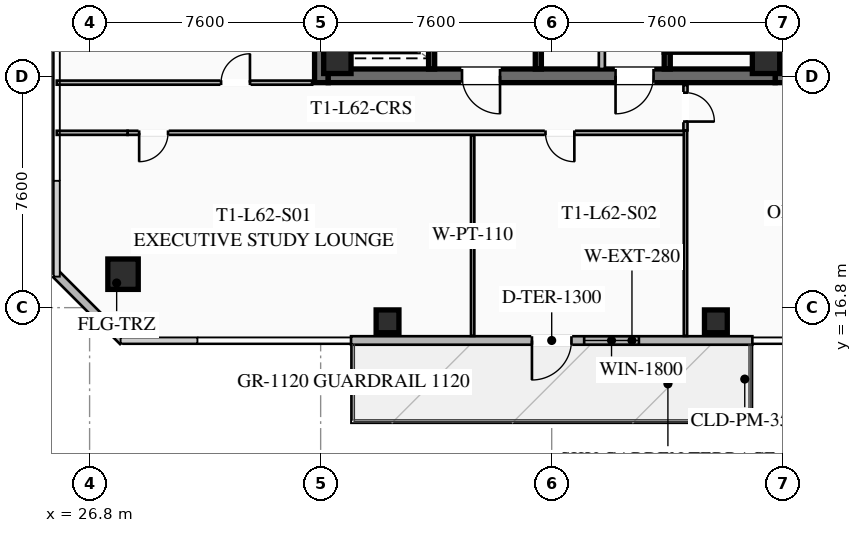
"""IFC4 building model, lengths in metres.
Left out: names, types, materials, properties, quantities, classifications, styles, units other than length and angle.
Written with IfcOpenShell. Run it as: python <this file> out.ifc"""

import sys

from ifc_helpers import new_model, si_unit, direction, frame, frame_2d, origin, origin_2d, place, context, subcontext, project, spatial, rectangle, hollow_rectangle, extrude, element, fill, save


model = new_model("IFC4")
c1 = context("Model", 3, precision=1e-05, world=origin(), true_north=direction((0.0, 1.0)))
c2 = subcontext(c1, "Body", "Model", "MODEL_VIEW")
j1 = project(units=[si_unit("LENGTHUNIT", "METRE"), si_unit("PLANEANGLEUNIT", "RADIAN")], contexts=[c1])
p1 = place(None, origin())
s1 = spatial("IfcSite", under=j1, at=p1, CompositionType="ELEMENT")
p2 = place(p1, origin())
s2 = spatial("IfcBuilding", under=s1, at=p2, CompositionType="ELEMENT")
p3 = place(p2, frame((0.0, 0.0, 229.05)))
s3 = spatial("IfcBuildingStorey", under=s2, at=p3, CompositionType="ELEMENT", Elevation=229.05)
for number, where, z_axis, x_axis in (
    (1, (34.425, 24.2, 0.0), (0.0, 0.0, 1.0), (0.0, 1.0, 0.0)),
    (2, (49.575, 39.8, 0.0), (0.0, 0.0, 1.0), (0.0, -1.0, 0.0)),
):
    element("IfcWall", number, at=place(p3, frame(where, z_axis=z_axis, x_axis=x_axis)), inside=s3, PredefinedType="SHEAR", context=c2, shape_type="SweptSolid", body=[
        extrude(rectangle(XDim=15.6, YDim=0.45, at=frame_2d((7.8, 0.0))), origin(), (0.0, 0.0, 1.0), 3.55),
    ])
p4 = place(p3, frame((49.35, 24.425, 0.0), z_axis=(0.0, 0.0, 1.0), x_axis=(-1.0, 0.0, 0.0)))
e3 = element("IfcWall", 3, at=p4, inside=s3, PredefinedType="SHEAR", context=c2, shape_type="SweptSolid", body=[
    extrude(rectangle(XDim=14.7, YDim=0.45, at=frame_2d((7.35, 0.0))), origin(), (0.0, 0.0, 1.0), 3.55),
])
p5 = place(p4, frame((9.05, 0.0, 0.0)))
e4 = element("IfcOpeningElement", 4, at=p5, cuts=e3, PredefinedType="OPENING", context=c2, shape_type="SweptSolid", body=[
    extrude(rectangle(XDim=1.25, YDim=2.25, at=frame_2d((0.625, 1.125))), frame((0.0, 0.235, 0.0), z_axis=(0.0, -1.0, 0.0), x_axis=(1.0, 0.0, 0.0)), (0.0, 0.0, 1.0), 0.47),
])
p6 = place(p4, frame((4.0, 0.0, 0.0)))
e5 = element("IfcOpeningElement", 5, at=p6, cuts=e3, PredefinedType="OPENING", context=c2, shape_type="SweptSolid", body=[
    extrude(rectangle(XDim=1.25, YDim=2.25, at=frame_2d((0.625, 1.125))), frame((0.0, 0.235, 0.0), z_axis=(0.0, -1.0, 0.0), x_axis=(1.0, 0.0, 0.0)), (0.0, 0.0, 1.0), 0.47),
])
for number, where, z_axis, x_axis in (
    (6, (34.95, 24.95, 0.0), (0.0, 0.0, 1.0), (1.0, 0.0, 0.0)),
    (7, (49.05, 24.95, 0.0), (0.0, 0.0, 1.0), (1.0, 0.0, 0.0)),
):
    element("IfcColumn", number, at=place(p3, frame(where, z_axis=z_axis, x_axis=x_axis)), inside=s3, PredefinedType="COLUMN", context=c2, shape_type="SweptSolid", body=[
        extrude(hollow_rectangle(XDim=0.9, YDim=0.9, WallThickness=0.04, at=origin_2d()), origin(), (0.0, 0.0, 1.0), 3.37),
    ])
p7 = place(p3, frame((27.9, 17.9, 0.0), z_axis=(0.0, 0.0, 1.0), x_axis=(1.0, 0.0, 0.0)))
e8 = element("IfcColumn", 8, at=p7, inside=s3, PredefinedType="COLUMN", context=c2, shape_type="SweptSolid", body=[
    extrude(hollow_rectangle(XDim=1.0, YDim=1.0, WallThickness=0.04, at=origin_2d()), origin(), (0.0, 0.0, 1.0), 3.37),
])
for number, where, z_axis, x_axis in (
    (9, (36.6, 16.35, 0.0), (0.0, 0.0, 1.0), (1.0, 0.0, 0.0)),
    (10, (47.4, 16.35, 0.0), (0.0, 0.0, 1.0), (1.0, 0.0, 0.0)),
):
    element("IfcColumn", number, at=place(p3, frame(where, z_axis=z_axis, x_axis=x_axis)), inside=s3, PredefinedType="COLUMN", context=c2, shape_type="SweptSolid", body=[
        extrude(hollow_rectangle(XDim=0.75, YDim=0.75, WallThickness=0.032, at=origin_2d()), origin(), (0.0, 0.0, 1.0), 3.37),
    ])
p8 = place(p3, frame((48.6, 15.72, 0.0), z_axis=(0.0, 0.0, 1.0), x_axis=(-1.0, 0.0, 0.0)))
e11 = element("IfcWall", 11, at=p8, inside=s3, PredefinedType="SOLIDWALL", context=c2, shape_type="SweptSolid", body=[
    extrude(rectangle(XDim=13.2, YDim=0.28, at=frame_2d((6.6, 0.0))), origin(), (0.0, 0.0, 1.0), 3.37),
])
p9 = place(p8, frame((5.95, 0.0, 0.0)))
e12 = element("IfcOpeningElement", 12, at=p9, cuts=e11, PredefinedType="OPENING", context=c2, shape_type="SweptSolid", body=[
    extrude(rectangle(XDim=1.3, YDim=2.15, at=frame_2d((0.65, 1.075))), frame((0.0, 0.15, 0.0), z_axis=(0.0, -1.0, 0.0), x_axis=(1.0, 0.0, 0.0)), (0.0, 0.0, 1.0), 0.3),
])
p10 = place(p8, frame((3.732, 0.0, 0.85)))
e13 = element("IfcOpeningElement", 13, at=p10, cuts=e11, PredefinedType="OPENING", context=c2, shape_type="SweptSolid", body=[
    extrude(rectangle(XDim=1.8, YDim=1.92, at=frame_2d((0.9, 0.96))), frame((0.0, 0.15, 0.0), z_axis=(0.0, -1.0, 0.0), x_axis=(1.0, 0.0, 0.0)), (0.0, 0.0, 1.0), 0.3),
])
p11 = place(p3, frame((27.9, 15.7, 0.0), z_axis=(0.0, 0.0, 1.0), x_axis=(-0.707106781187, 0.707106781187, 0.0)))
e14 = element("IfcWall", 14, at=p11, inside=s3, PredefinedType="SOLIDWALL", context=c2, shape_type="SweptSolid", body=[
    extrude(rectangle(XDim=3.111, YDim=0.28, at=frame_2d((1.556, 0.0))), origin(), (0.0, 0.0, 1.0), 3.37),
])
p12 = place(p3, frame((45.8, 32.8, 0.0), z_axis=(0.0, 0.0, 1.0), x_axis=(0.0, -1.0, 0.0)))
e15 = element("IfcWall", 15, at=p12, inside=s3, PredefinedType="SHEAR", context=c2, shape_type="SweptSolid", body=[
    extrude(rectangle(XDim=8.15, YDim=0.2, at=frame_2d((4.075, 0.0))), origin(), (0.0, 0.0, 1.0), 3.37),
])
p13 = place(p12, frame((0.45, 0.0, 0.0)))
e16 = element("IfcOpeningElement", 16, at=p13, cuts=e15, PredefinedType="OPENING", context=c2, shape_type="SweptSolid", body=[
    extrude(rectangle(XDim=1.15, YDim=2.2, at=frame_2d((0.575, 1.1))), frame((0.0, 0.11, 0.0), z_axis=(0.0, -1.0, 0.0), x_axis=(1.0, 0.0, 0.0)), (0.0, 0.0, 1.0), 0.22),
])
p14 = place(p3, frame((41.56, 24.65, 0.0), z_axis=(0.0, 0.0, 1.0), x_axis=(0.0, 1.0, 0.0)))
e17 = element("IfcWall", 17, at=p14, inside=s3, PredefinedType="SHEAR", context=c2, shape_type="SweptSolid", body=[
    extrude(rectangle(XDim=14.7, YDim=0.2, at=frame_2d((7.35, 0.0))), origin(), (0.0, 0.0, 1.0), 3.37),
])
p15 = place(p3, frame((38.05, 24.65, 0.0), z_axis=(0.0, 0.0, 1.0), x_axis=(0.0, 1.0, 0.0)))
e18 = element("IfcWall", 18, at=p15, inside=s3, PredefinedType="SHEAR", context=c2, shape_type="SweptSolid", body=[
    extrude(rectangle(XDim=6.55, YDim=0.2, at=frame_2d((3.275, 0.0))), origin(), (0.0, 0.0, 1.0), 3.37),
])
p16 = place(p15, frame((4.975, 0.0, 0.0)))
e19 = element("IfcOpeningElement", 19, at=p16, cuts=e18, PredefinedType="OPENING", context=c2, shape_type="SweptSolid", body=[
    extrude(rectangle(XDim=1.3, YDim=2.25, at=frame_2d((0.65, 1.125))), frame((0.0, 0.11, 0.0), z_axis=(0.0, -1.0, 0.0), x_axis=(1.0, 0.0, 0.0)), (0.0, 0.0, 1.0), 0.22),
])
p17 = place(p15, frame((2.975, 0.0, 0.0)))
e20 = element("IfcOpeningElement", 20, at=p17, cuts=e18, PredefinedType="OPENING", context=c2, shape_type="SweptSolid", body=[
    extrude(rectangle(XDim=1.3, YDim=2.25, at=frame_2d((0.65, 1.125))), frame((0.0, 0.11, 0.0), z_axis=(0.0, -1.0, 0.0), x_axis=(1.0, 0.0, 0.0)), (0.0, 0.0, 1.0), 0.22),
])
p18 = place(p15, frame((0.775, 0.0, 0.0)))
e21 = element("IfcOpeningElement", 21, at=p18, cuts=e18, PredefinedType="OPENING", context=c2, shape_type="SweptSolid", body=[
    extrude(rectangle(XDim=1.3, YDim=2.25, at=frame_2d((0.65, 1.125))), frame((0.0, 0.11, 0.0), z_axis=(0.0, -1.0, 0.0), x_axis=(1.0, 0.0, 0.0)), (0.0, 0.0, 1.0), 0.22),
])
p19 = place(p3, frame((43.65, 24.65, 0.0), z_axis=(0.0, 0.0, 1.0), x_axis=(0.0, 1.0, 0.0)))
e22 = element("IfcWall", 22, at=p19, inside=s3, PredefinedType="SOLIDWALL", context=c2, shape_type="SweptSolid", body=[
    extrude(rectangle(XDim=7.0, YDim=0.2, at=frame_2d((3.5, 0.0))), origin(), (0.0, 0.0, 1.0), 2.513),
])
p20 = place(p19, frame((0.85, 0.0, 0.0)))
e23 = element("IfcOpeningElement", 23, at=p20, cuts=e22, PredefinedType="OPENING", context=c2, shape_type="SweptSolid", body=[
    extrude(rectangle(XDim=0.95, YDim=2.05, at=frame_2d((0.475, 1.025))), frame((0.0, 0.11, 0.0), z_axis=(0.0, -1.0, 0.0), x_axis=(1.0, 0.0, 0.0)), (0.0, 0.0, 1.0), 0.22),
])
p21 = place(p19, frame((4.8, 0.0, 0.0)))
e24 = element("IfcOpeningElement", 24, at=p21, cuts=e22, PredefinedType="OPENING", context=c2, shape_type="SweptSolid", body=[
    extrude(rectangle(XDim=1.05, YDim=2.2, at=frame_2d((0.525, 1.1))), frame((0.0, 0.11, 0.0), z_axis=(0.0, -1.0, 0.0), x_axis=(1.0, 0.0, 0.0)), (0.0, 0.0, 1.0), 0.22),
])
p22 = place(p3, frame((46.4, 22.55, 0.0), z_axis=(0.0, 0.0, 1.0), x_axis=(-1.0, 0.0, 0.0)))
e25 = element("IfcWall", 25, at=p22, inside=s3, PredefinedType="PARTITIONING", context=c2, shape_type="SweptSolid", body=[
    extrude(rectangle(XDim=18.35, YDim=0.135, at=frame_2d((9.175, 0.0))), origin(), (0.0, 0.0, 1.0), 2.513),
])
p23 = place(p22, frame((17.02, 0.0, 0.0)))
e26 = element("IfcOpeningElement", 26, at=p23, cuts=e25, PredefinedType="OPENING", context=c2, shape_type="SweptSolid", body=[
    extrude(rectangle(XDim=0.95, YDim=2.05, at=frame_2d((0.475, 1.025))), frame((0.0, 0.077, 0.0), z_axis=(0.0, -1.0, 0.0), x_axis=(1.0, 0.0, 0.0)), (0.0, 0.0, 1.0), 0.155),
])
p24 = place(p22, frame((3.655, 0.0, 0.0)))
e27 = element("IfcOpeningElement", 27, at=p24, cuts=e25, PredefinedType="OPENING", context=c2, shape_type="SweptSolid", body=[
    extrude(rectangle(XDim=0.95, YDim=2.05, at=frame_2d((0.475, 1.025))), frame((0.0, 0.077, 0.0), z_axis=(0.0, -1.0, 0.0), x_axis=(1.0, 0.0, 0.0)), (0.0, 0.0, 1.0), 0.155),
])
p25 = place(p3, frame((25.72, 22.55, 0.0), z_axis=(0.0, 0.0, 1.0), x_axis=(1.0, 0.0, 0.0)))
e28 = element("IfcWall", 28, at=p25, inside=s3, PredefinedType="PARTITIONING", context=c2, shape_type="SweptSolid", body=[
    extrude(rectangle(XDim=2.33, YDim=0.135, at=frame_2d((1.165, 0.0))), origin(), (0.0, 0.0, 1.0), 2.513),
])
p26 = place(p3, frame((46.4, 24.12, 0.0), z_axis=(0.0, 0.0, 1.0), x_axis=(0.0, -1.0, 0.0)))
e29 = element("IfcWall", 29, at=p26, inside=s3, PredefinedType="PARTITIONING", context=c2, shape_type="SweptSolid", body=[
    extrude(rectangle(XDim=1.49, YDim=0.135, at=frame_2d((0.745, 0.0))), origin(), (0.0, 0.0, 1.0), 2.513),
])
p27 = place(p26, frame((0.25, 0.0, 0.0)))
e30 = element("IfcOpeningElement", 30, at=p27, cuts=e29, PredefinedType="OPENING", context=c2, shape_type="SweptSolid", body=[
    extrude(rectangle(XDim=0.95, YDim=2.05, at=frame_2d((0.475, 1.025))), frame((0.0, 0.077, 0.0), z_axis=(0.0, -1.0, 0.0), x_axis=(1.0, 0.0, 0.0)), (0.0, 0.0, 1.0), 0.155),
])
p28 = place(p3, frame((39.4, 15.87, 0.0), z_axis=(0.0, 0.0, 1.0), x_axis=(0.0, 1.0, 0.0)))
e31 = element("IfcWall", 31, at=p28, inside=s3, PredefinedType="PARTITIONING", context=c2, shape_type="SweptSolid", body=[
    extrude(rectangle(XDim=6.6, YDim=0.11, at=frame_2d((3.3, 0.0))), origin(), (0.0, 0.0, 1.0), 2.513),
])
p29 = place(p3, frame((46.4, 15.87, 0.0), z_axis=(0.0, 0.0, 1.0), x_axis=(0.0, 1.0, 0.0)))
e32 = element("IfcWall", 32, at=p29, inside=s3, PredefinedType="PARTITIONING", context=c2, shape_type="SweptSolid", body=[
    extrude(rectangle(XDim=6.76, YDim=0.11, at=frame_2d((3.38, 0.0))), origin(), (0.0, 0.0, 1.0), 2.513),
])
p30 = place(p3, frame((25.72, 24.2, 0.0), z_axis=(0.0, 0.0, 1.0), x_axis=(1.0, 0.0, 0.0)))
e33 = element("IfcWall", 33, at=p30, inside=s3, PredefinedType="PARTITIONING", context=c2, shape_type="SweptSolid", body=[
    extrude(rectangle(XDim=8.4, YDim=0.135, at=frame_2d((4.2, 0.0))), origin(), (0.0, 0.0, 1.0), 2.513),
])
p31 = place(p30, frame((5.405, 0.0, 0.0)))
e34 = element("IfcOpeningElement", 34, at=p31, cuts=e33, PredefinedType="OPENING", context=c2, shape_type="SweptSolid", body=[
    extrude(rectangle(XDim=0.95, YDim=2.05, at=frame_2d((0.475, 1.025))), frame((0.0, 0.077, 0.0), z_axis=(0.0, -1.0, 0.0), x_axis=(1.0, 0.0, 0.0)), (0.0, 0.0, 1.0), 0.155),
])
p32 = place(p9, origin())
e35 = element("IfcDoor", 35, at=p32, inside=s3, OperationType="SINGLE_SWING_RIGHT", PredefinedType="DOOR", context=c2, shape_type="SweptSolid", body=[
    extrude(rectangle(XDim=1.3, YDim=2.15, at=frame_2d((0.65, 1.075))), frame((0.0, 0.025, 0.0), z_axis=(0.0, -1.0, 0.0), x_axis=(1.0, 0.0, 0.0)), (0.0, 0.0, 1.0), 0.05),
])
fill(e12, e35)
p33 = place(p10, origin())
e36 = element("IfcWindow", 36, at=p33, inside=s3, PartitioningType="SINGLE_PANEL", PredefinedType="WINDOW", context=c2, shape_type="SweptSolid", body=[
    extrude(rectangle(XDim=1.8, YDim=1.92, at=frame_2d((0.9, 0.96))), frame((0.0, 0.03, 0.0), z_axis=(0.0, -1.0, 0.0), x_axis=(1.0, 0.0, 0.0)), (0.0, 0.0, 1.0), 0.06),
])
fill(e13, e36)
p34 = place(p5, origin())
e37 = element("IfcDoor", 37, at=p34, inside=s3, OperationType="SINGLE_SWING_LEFT", PredefinedType="DOOR", context=c2, shape_type="SweptSolid", body=[
    extrude(rectangle(XDim=1.25, YDim=2.25, at=frame_2d((0.625, 1.125))), frame((0.0, 0.025, 0.0), z_axis=(0.0, -1.0, 0.0), x_axis=(1.0, 0.0, 0.0)), (0.0, 0.0, 1.0), 0.05),
])
fill(e4, e37)
p35 = place(p6, origin())
e38 = element("IfcDoor", 38, at=p35, inside=s3, OperationType="SINGLE_SWING_RIGHT", PredefinedType="DOOR", context=c2, shape_type="SweptSolid", body=[
    extrude(rectangle(XDim=1.25, YDim=2.25, at=frame_2d((0.625, 1.125))), frame((0.0, 0.025, 0.0), z_axis=(0.0, -1.0, 0.0), x_axis=(1.0, 0.0, 0.0)), (0.0, 0.0, 1.0), 0.05),
])
fill(e5, e38)
p36 = place(p23, origin())
e39 = element("IfcDoor", 39, at=p36, inside=s3, OperationType="SINGLE_SWING_RIGHT", PredefinedType="DOOR", context=c2, shape_type="SweptSolid", body=[
    extrude(rectangle(XDim=0.95, YDim=2.05, at=frame_2d((0.475, 1.025))), frame((0.0, 0.025, 0.0), z_axis=(0.0, -1.0, 0.0), x_axis=(1.0, 0.0, 0.0)), (0.0, 0.0, 1.0), 0.05),
])
fill(e26, e39)
p37 = place(p24, origin())
e40 = element("IfcDoor", 40, at=p37, inside=s3, OperationType="SINGLE_SWING_LEFT", PredefinedType="DOOR", context=c2, shape_type="SweptSolid", body=[
    extrude(rectangle(XDim=0.95, YDim=2.05, at=frame_2d((0.475, 1.025))), frame((0.0, 0.025, 0.0), z_axis=(0.0, -1.0, 0.0), x_axis=(1.0, 0.0, 0.0)), (0.0, 0.0, 1.0), 0.05),
])
fill(e27, e40)
p38 = place(p27, origin())
e41 = element("IfcDoor", 41, at=p38, inside=s3, OperationType="SINGLE_SWING_RIGHT", PredefinedType="DOOR", context=c2, shape_type="SweptSolid", body=[
    extrude(rectangle(XDim=0.95, YDim=2.05, at=frame_2d((0.475, 1.025))), frame((0.0, 0.025, 0.0), z_axis=(0.0, -1.0, 0.0), x_axis=(1.0, 0.0, 0.0)), (0.0, 0.0, 1.0), 0.05),
])
fill(e30, e41)
p39 = place(p31, origin())
e42 = element("IfcDoor", 42, at=p39, inside=s3, OperationType="SINGLE_SWING_RIGHT", PredefinedType="DOOR", context=c2, shape_type="SweptSolid", body=[
    extrude(rectangle(XDim=0.95, YDim=2.05, at=frame_2d((0.475, 1.025))), frame((0.0, 0.025, 0.0), z_axis=(0.0, -1.0, 0.0), x_axis=(1.0, 0.0, 0.0)), (0.0, 0.0, 1.0), 0.05),
])
fill(e34, e42)
save(model, sys.argv[1])
